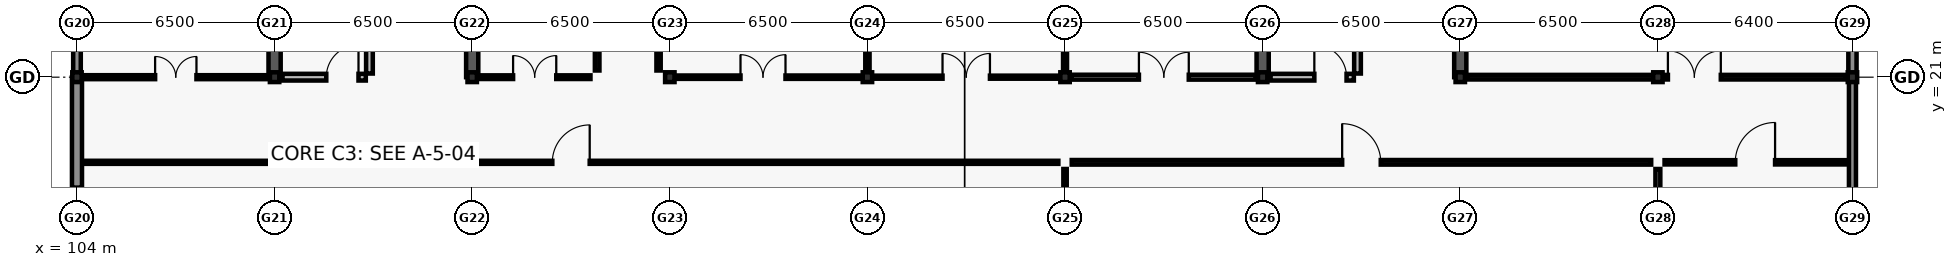
"""IFC4 building model, lengths in metres.
Left out: names, types, materials, properties, quantities, classifications, styles, units other than length and angle.
Written with IfcOpenShell. Run it as: python <this file> out.ifc"""

import sys

from ifc_helpers import new_model, si_unit, direction, frame, frame_2d, origin, origin_2d, place, context, subcontext, project, spatial, rectangle, i_section, extrude, element, fill, save


model = new_model("IFC4")
c1 = context("Model", 3, precision=1e-05, world=origin(), true_north=direction((0.0, 1.0)))
c2 = subcontext(c1, "Body", "Model", "MODEL_VIEW")
j1 = project(units=[si_unit("LENGTHUNIT", "METRE"), si_unit("PLANEANGLEUNIT", "RADIAN")], contexts=[c1])
p1 = place(None, origin())
s1 = spatial("IfcSite", under=j1, at=p1, CompositionType="ELEMENT")
p2 = place(p1, origin())
s2 = spatial("IfcBuilding", under=s1, at=p2, CompositionType="ELEMENT")
p3 = place(p2, frame((0.0, 0.0, 9.6)))
s3 = spatial("IfcBuildingStorey", under=s2, at=p3, CompositionType="ELEMENT", Elevation=9.6)
for number, where, z_axis, x_axis in (
    (1, (104.0, 21.0, 0.0), (0.0, 0.0, 1.0), (1.0, 0.0, 0.0)),
    (2, (110.5, 21.0, 0.0), (0.0, 0.0, 1.0), (1.0, 0.0, 0.0)),
    (3, (117.0, 21.0, 0.0), (0.0, 0.0, 1.0), (1.0, 0.0, 0.0)),
    (4, (123.5, 21.0, 0.0), (0.0, 0.0, 1.0), (1.0, 0.0, 0.0)),
    (5, (130.0, 21.0, 0.0), (0.0, 0.0, 1.0), (1.0, 0.0, 0.0)),
    (6, (136.5, 21.0, 0.0), (0.0, 0.0, 1.0), (1.0, 0.0, 0.0)),
    (7, (143.0, 21.0, 0.0), (0.0, 0.0, 1.0), (1.0, 0.0, 0.0)),
    (8, (149.5, 21.0, 0.0), (0.0, 0.0, 1.0), (1.0, 0.0, 0.0)),
    (9, (156.0, 21.0, 0.0), (0.0, 0.0, 1.0), (1.0, 0.0, 0.0)),
    (10, (162.4, 21.0, 0.0), (0.0, 0.0, 1.0), (1.0, 0.0, 0.0)),
):
    element("IfcColumn", number, at=place(p3, frame(where, z_axis=z_axis, x_axis=x_axis)), inside=s3, PredefinedType="COLUMN", context=c2, shape_type="SweptSolid", body=[
        extrude(i_section(OverallWidth=0.309, OverallDepth=0.321, WebThickness=0.014, FlangeThickness=0.022, FilletRadius=0.017, at=origin_2d()), origin(), (0.0, 0.0, 1.0), 3.9),
    ])
for number, where, z_axis, x_axis in (
    (11, (110.5, 21.0, 0.0), (0.0, 0.0, 1.0), (0.0, 1.0, 0.0)),
    (12, (117.0, 21.0, 0.0), (0.0, 0.0, 1.0), (0.0, 1.0, 0.0)),
    (13, (143.0, 21.0, 0.0), (0.0, 0.0, 1.0), (0.0, 1.0, 0.0)),
    (14, (149.5, 21.0, 0.0), (0.0, 0.0, 1.0), (0.0, 1.0, 0.0)),
):
    element("IfcWall", number, at=place(p3, frame(where, z_axis=z_axis, x_axis=x_axis)), inside=s3, PredefinedType="SHEAR", context=c2, shape_type="SweptSolid", body=[
        extrude(rectangle(XDim=6.4, YDim=0.4, at=frame_2d((3.2, 0.0))), origin(), (0.0, 0.0, 1.0), 3.66),
    ])
p4 = place(p3, frame((104.0, 14.405, 0.0), z_axis=(0.0, 0.0, 1.0), x_axis=(0.0, 1.0, 0.0)))
e15 = element("IfcWall", 15, at=p4, inside=s3, PredefinedType="SOLIDWALL", context=c2, shape_type="SweptSolid", body=[
    extrude(rectangle(XDim=6.59, YDim=0.33, at=frame_2d((3.295, 0.0))), origin(), (0.0, 0.0, 1.0), 3.02),
])
p5 = place(p4, frame((0.863, 0.0, 0.8)))
e16 = element("IfcOpeningElement", 16, at=p5, cuts=e15, PredefinedType="OPENING", context=c2, shape_type="SweptSolid", body=[
    extrude(rectangle(XDim=2.1, YDim=1.25, at=frame_2d((1.05, 0.625))), frame((0.0, 0.175, 0.0), z_axis=(0.0, -1.0, 0.0), x_axis=(1.0, 0.0, 0.0)), (0.0, 0.0, 1.0), 0.35),
])
p6 = place(p3, frame((162.4, 20.995, 0.0), z_axis=(0.0, 0.0, 1.0), x_axis=(0.0, -1.0, 0.0)))
e17 = element("IfcWall", 17, at=p6, inside=s3, PredefinedType="SOLIDWALL", context=c2, shape_type="SweptSolid", body=[
    extrude(rectangle(XDim=6.59, YDim=0.23, at=frame_2d((3.295, 0.0))), origin(), (0.0, 0.0, 1.0), 3.02),
])
p7 = place(p6, frame((3.827, 0.0, 0.8)))
e18 = element("IfcOpeningElement", 18, at=p7, cuts=e17, PredefinedType="OPENING", context=c2, shape_type="SweptSolid", body=[
    extrude(rectangle(XDim=1.7, YDim=1.25, at=frame_2d((0.85, 0.625))), frame((0.0, 0.125, 0.0), z_axis=(0.0, -1.0, 0.0), x_axis=(1.0, 0.0, 0.0)), (0.0, 0.0, 1.0), 0.25),
])
p8 = place(p3, frame((104.0, 21.005, 0.0), z_axis=(0.0, 0.0, 1.0), x_axis=(0.0, 1.0, 0.0)))
e19 = element("IfcWall", 19, at=p8, inside=s3, PredefinedType="SOLIDWALL", context=c2, shape_type="SweptSolid", body=[
    extrude(rectangle(XDim=6.59, YDim=0.25, at=frame_2d((3.295, 0.0))), origin(), (0.0, 0.0, 1.0), 3.02),
])
p9 = place(p8, frame((2.745, 0.0, 0.8)))
e20 = element("IfcOpeningElement", 20, at=p9, cuts=e19, PredefinedType="OPENING", context=c2, shape_type="SweptSolid", body=[
    extrude(rectangle(XDim=1.1, YDim=1.5, at=frame_2d((0.55, 0.75))), frame((0.0, 0.135, 0.0), z_axis=(0.0, -1.0, 0.0), x_axis=(1.0, 0.0, 0.0)), (0.0, 0.0, 1.0), 0.27),
])
p10 = place(p3, frame((162.4, 27.595, 0.0), z_axis=(0.0, 0.0, 1.0), x_axis=(0.0, -1.0, 0.0)))
e21 = element("IfcWall", 21, at=p10, inside=s3, PredefinedType="SOLIDWALL", context=c2, shape_type="SweptSolid", body=[
    extrude(rectangle(XDim=6.59, YDim=0.27, at=frame_2d((3.295, 0.0))), origin(), (0.0, 0.0, 1.0), 3.02),
])
p11 = place(p10, frame((2.67, 0.0, 0.8)))
e22 = element("IfcOpeningElement", 22, at=p11, cuts=e21, PredefinedType="OPENING", context=c2, shape_type="SweptSolid", body=[
    extrude(rectangle(XDim=1.25, YDim=1.5, at=frame_2d((0.625, 0.75))), frame((0.0, 0.145, 0.0), z_axis=(0.0, -1.0, 0.0), x_axis=(1.0, 0.0, 0.0)), (0.0, 0.0, 1.0), 0.29),
])
p12 = place(p3, frame((113.62, 21.12, 0.0), z_axis=(0.0, 0.0, 1.0), x_axis=(0.0, 1.0, 0.0)))
e23 = element("IfcWall", 23, at=p12, inside=s3, PredefinedType="SOLIDWALL", context=c2, shape_type="SweptSolid", body=[
    extrude(rectangle(XDim=6.255, YDim=0.22, at=frame_2d((3.127, 0.0))), origin(), (0.0, 0.0, 1.0), 3.66),
])
p13 = place(p3, frame((110.76, 21.0, 0.0), z_axis=(0.0, 0.0, 1.0), x_axis=(1.0, 0.0, 0.0)))
e24 = element("IfcWall", 24, at=p13, inside=s3, PredefinedType="SOLIDWALL", context=c2, shape_type="SweptSolid", body=[
    extrude(rectangle(XDim=2.74, YDim=0.22, at=frame_2d((1.37, 0.0))), origin(), (0.0, 0.0, 1.0), 3.02),
])
p14 = place(p13, frame((1.44, 0.0, 0.0)))
e25 = element("IfcOpeningElement", 25, at=p14, cuts=e24, PredefinedType="OPENING", context=c2, shape_type="SweptSolid", body=[
    extrude(rectangle(XDim=1.06, YDim=2.1, at=frame_2d((0.53, 1.05))), frame((0.0, 0.12, 0.0), z_axis=(0.0, -1.0, 0.0), x_axis=(1.0, 0.0, 0.0)), (0.0, 0.0, 1.0), 0.24),
])
p15 = place(p3, frame((146.12, 21.12, 0.0), z_axis=(0.0, 0.0, 1.0), x_axis=(0.0, 1.0, 0.0)))
e26 = element("IfcWall", 26, at=p15, inside=s3, PredefinedType="SOLIDWALL", context=c2, shape_type="SweptSolid", body=[
    extrude(rectangle(XDim=6.255, YDim=0.22, at=frame_2d((3.127, 0.0))), origin(), (0.0, 0.0, 1.0), 3.66),
])
p16 = place(p3, frame((143.26, 21.0, 0.0), z_axis=(0.0, 0.0, 1.0), x_axis=(1.0, 0.0, 0.0)))
e27 = element("IfcWall", 27, at=p16, inside=s3, PredefinedType="SOLIDWALL", context=c2, shape_type="SweptSolid", body=[
    extrude(rectangle(XDim=2.74, YDim=0.22, at=frame_2d((1.37, 0.0))), origin(), (0.0, 0.0, 1.0), 3.02),
])
p17 = place(p16, frame((1.44, 0.0, 0.0)))
e28 = element("IfcOpeningElement", 28, at=p17, cuts=e27, PredefinedType="OPENING", context=c2, shape_type="SweptSolid", body=[
    extrude(rectangle(XDim=1.06, YDim=2.1, at=frame_2d((0.53, 1.05))), frame((0.0, 0.12, 0.0), z_axis=(0.0, -1.0, 0.0), x_axis=(1.0, 0.0, 0.0)), (0.0, 0.0, 1.0), 0.24),
])
p18 = place(p3, frame((121.11, 21.22, 0.0), z_axis=(0.0, 0.0, 1.0), x_axis=(0.0, 1.0, 0.0)))
e29 = element("IfcWall", 29, at=p18, inside=s3, PredefinedType="PARTITIONING", context=c2, shape_type="SweptSolid", body=[
    extrude(rectangle(XDim=2.76, YDim=0.15, at=frame_2d((1.38, 0.0))), origin(), (0.0, 0.0, 1.0), 3.0),
])
p19 = place(p18, frame((0.845, 0.0, 0.0)))
e30 = element("IfcOpeningElement", 30, at=p19, cuts=e29, PredefinedType="OPENING", context=c2, shape_type="SweptSolid", body=[
    extrude(rectangle(XDim=1.07, YDim=2.08, at=frame_2d((0.535, 1.04))), frame((0.0, 0.085, 0.0), z_axis=(0.0, -1.0, 0.0), x_axis=(1.0, 0.0, 0.0)), (0.0, 0.0, 1.0), 0.17),
])
p20 = place(p3, frame((123.13, 21.22, 0.0), z_axis=(0.0, 0.0, 1.0), x_axis=(0.0, 1.0, 0.0)))
e31 = element("IfcWall", 31, at=p20, inside=s3, PredefinedType="PARTITIONING", context=c2, shape_type="SweptSolid", body=[
    extrude(rectangle(XDim=2.76, YDim=0.14, at=frame_2d((1.38, 0.0))), origin(), (0.0, 0.0, 1.0), 3.0),
])
p21 = place(p20, frame((0.825, 0.0, 0.0)))
e32 = element("IfcOpeningElement", 32, at=p21, cuts=e31, PredefinedType="OPENING", context=c2, shape_type="SweptSolid", body=[
    extrude(rectangle(XDim=1.11, YDim=2.1, at=frame_2d((0.555, 1.05))), frame((0.0, 0.08, 0.0), z_axis=(0.0, -1.0, 0.0), x_axis=(1.0, 0.0, 0.0)), (0.0, 0.0, 1.0), 0.16),
])
p22 = place(p3, frame((136.5, 8.02, 0.0), z_axis=(0.0, 0.0, 1.0), x_axis=(0.0, 1.0, 0.0)))
e33 = element("IfcWall", 33, at=p22, inside=s3, PredefinedType="PARTITIONING", context=c2, shape_type="SweptSolid", body=[
    extrude(rectangle(XDim=9.96, YDim=0.11, at=frame_2d((4.98, 0.0))), origin(), (0.0, 0.0, 1.0), 3.0),
])
p23 = place(p3, frame((104.22, 18.2, 0.0), z_axis=(0.0, 0.0, 1.0), x_axis=(1.0, 0.0, 0.0)))
e34 = element("IfcWall", 34, at=p23, inside=s3, PredefinedType="PARTITIONING", context=c2, shape_type="SweptSolid", body=[
    extrude(rectangle(XDim=32.06, YDim=0.1, at=frame_2d((16.03, 0.0))), origin(), (0.0, 0.0, 1.0), 3.0),
])
p24 = place(p23, frame((15.415, 0.0, 0.0)))
e35 = element("IfcOpeningElement", 35, at=p24, cuts=e34, PredefinedType="OPENING", context=c2, shape_type="SweptSolid", body=[
    extrude(rectangle(XDim=1.23, YDim=2.08, at=frame_2d((0.615, 1.04))), frame((0.0, 0.06, 0.0), z_axis=(0.0, -1.0, 0.0), x_axis=(1.0, 0.0, 0.0)), (0.0, 0.0, 1.0), 0.12),
])
p25 = place(p3, frame((156.0, 14.62, 0.0), z_axis=(0.0, 0.0, 1.0), x_axis=(0.0, 1.0, 0.0)))
e36 = element("IfcWall", 36, at=p25, inside=s3, PredefinedType="PARTITIONING", context=c2, shape_type="SweptSolid", body=[
    extrude(rectangle(XDim=3.36, YDim=0.16, at=frame_2d((1.68, 0.0))), origin(), (0.0, 0.0, 1.0), 3.0),
])
p26 = place(p3, frame((136.72, 18.2, 0.0), z_axis=(0.0, 0.0, 1.0), x_axis=(1.0, 0.0, 0.0)))
e37 = element("IfcWall", 37, at=p26, inside=s3, PredefinedType="PARTITIONING", context=c2, shape_type="SweptSolid", body=[
    extrude(rectangle(XDim=19.06, YDim=0.15, at=frame_2d((9.53, 0.0))), origin(), (0.0, 0.0, 1.0), 3.0),
])
p27 = place(p26, frame((8.895, 0.0, 0.0)))
e38 = element("IfcOpeningElement", 38, at=p27, cuts=e37, PredefinedType="OPENING", context=c2, shape_type="SweptSolid", body=[
    extrude(rectangle(XDim=1.27, YDim=2.1, at=frame_2d((0.635, 1.05))), frame((0.0, 0.085, 0.0), z_axis=(0.0, -1.0, 0.0), x_axis=(1.0, 0.0, 0.0)), (0.0, 0.0, 1.0), 0.17),
])
p28 = place(p3, frame((156.22, 18.2, 0.0), z_axis=(0.0, 0.0, 1.0), x_axis=(1.0, 0.0, 0.0)))
e39 = element("IfcWall", 39, at=p28, inside=s3, PredefinedType="PARTITIONING", context=c2, shape_type="SweptSolid", body=[
    extrude(rectangle(XDim=5.96, YDim=0.14, at=frame_2d((2.98, 0.0))), origin(), (0.0, 0.0, 1.0), 3.0),
])
p29 = place(p28, frame((2.325, 0.0, 0.0)))
e40 = element("IfcOpeningElement", 40, at=p29, cuts=e39, PredefinedType="OPENING", context=c2, shape_type="SweptSolid", body=[
    extrude(rectangle(XDim=1.31, YDim=2.14, at=frame_2d((0.655, 1.07))), frame((0.0, 0.08, 0.0), z_axis=(0.0, -1.0, 0.0), x_axis=(1.0, 0.0, 0.0)), (0.0, 0.0, 1.0), 0.16),
])
p30 = place(p3, frame((104.22, 21.0, 0.0), z_axis=(0.0, 0.0, 1.0), x_axis=(1.0, 0.0, 0.0)))
e41 = element("IfcWall", 41, at=p30, inside=s3, PredefinedType="PARTITIONING", context=c2, shape_type="SweptSolid", body=[
    extrude(rectangle(XDim=6.06, YDim=0.13, at=frame_2d((3.03, 0.0))), origin(), (0.0, 0.0, 1.0), 3.0),
])
p31 = place(p30, frame((2.35, 0.0, 0.0)))
e42 = element("IfcOpeningElement", 42, at=p31, cuts=e41, PredefinedType="OPENING", context=c2, shape_type="SweptSolid", body=[
    extrude(rectangle(XDim=1.36, YDim=2.15, at=frame_2d((0.68, 1.075))), frame((0.0, 0.075, 0.0), z_axis=(0.0, -1.0, 0.0), x_axis=(1.0, 0.0, 0.0)), (0.0, 0.0, 1.0), 0.15),
])
p32 = place(p3, frame((117.22, 21.0, 0.0), z_axis=(0.0, 0.0, 1.0), x_axis=(1.0, 0.0, 0.0)))
e43 = element("IfcWall", 43, at=p32, inside=s3, PredefinedType="PARTITIONING", context=c2, shape_type="SweptSolid", body=[
    extrude(rectangle(XDim=3.67, YDim=0.12, at=frame_2d((1.835, 0.0))), origin(), (0.0, 0.0, 1.0), 3.0),
])
p33 = place(p32, frame((1.125, 0.0, 0.0)))
e44 = element("IfcOpeningElement", 44, at=p33, cuts=e43, PredefinedType="OPENING", context=c2, shape_type="SweptSolid", body=[
    extrude(rectangle(XDim=1.42, YDim=2.15, at=frame_2d((0.71, 1.075))), frame((0.0, 0.07, 0.0), z_axis=(0.0, -1.0, 0.0), x_axis=(1.0, 0.0, 0.0)), (0.0, 0.0, 1.0), 0.14),
])
p34 = place(p3, frame((123.35, 21.0, 0.0), z_axis=(0.0, 0.0, 1.0), x_axis=(1.0, 0.0, 0.0)))
e45 = element("IfcWall", 45, at=p34, inside=s3, PredefinedType="PARTITIONING", context=c2, shape_type="SweptSolid", body=[
    extrude(rectangle(XDim=6.43, YDim=0.11, at=frame_2d((3.215, 0.0))), origin(), (0.0, 0.0, 1.0), 3.0),
])
p35 = place(p34, frame((2.475, 0.0, 0.0)))
e46 = element("IfcOpeningElement", 46, at=p35, cuts=e45, PredefinedType="OPENING", context=c2, shape_type="SweptSolid", body=[
    extrude(rectangle(XDim=1.48, YDim=2.18, at=frame_2d((0.74, 1.09))), frame((0.0, 0.065, 0.0), z_axis=(0.0, -1.0, 0.0), x_axis=(1.0, 0.0, 0.0)), (0.0, 0.0, 1.0), 0.13),
])
p36 = place(p3, frame((130.22, 21.0, 0.0), z_axis=(0.0, 0.0, 1.0), x_axis=(1.0, 0.0, 0.0)))
e47 = element("IfcWall", 47, at=p36, inside=s3, PredefinedType="PARTITIONING", context=c2, shape_type="SweptSolid", body=[
    extrude(rectangle(XDim=6.06, YDim=0.1, at=frame_2d((3.03, 0.0))), origin(), (0.0, 0.0, 1.0), 3.0),
])
p37 = place(p36, frame((2.25, 0.0, 0.0)))
e48 = element("IfcOpeningElement", 48, at=p37, cuts=e47, PredefinedType="OPENING", context=c2, shape_type="SweptSolid", body=[
    extrude(rectangle(XDim=1.56, YDim=2.18, at=frame_2d((0.78, 1.09))), frame((0.0, 0.06, 0.0), z_axis=(0.0, -1.0, 0.0), x_axis=(1.0, 0.0, 0.0)), (0.0, 0.0, 1.0), 0.12),
])
p38 = place(p3, frame((136.72, 21.0, 0.0), z_axis=(0.0, 0.0, 1.0), x_axis=(1.0, 0.0, 0.0)))
e49 = element("IfcWall", 49, at=p38, inside=s3, PredefinedType="PARTITIONING", context=c2, shape_type="SweptSolid", body=[
    extrude(rectangle(XDim=6.06, YDim=0.16, at=frame_2d((3.03, 0.0))), origin(), (0.0, 0.0, 1.0), 3.0),
])
p39 = place(p38, frame((2.21, 0.0, 0.0)))
e50 = element("IfcOpeningElement", 50, at=p39, cuts=e49, PredefinedType="OPENING", context=c2, shape_type="SweptSolid", body=[
    extrude(rectangle(XDim=1.64, YDim=2.2, at=frame_2d((0.82, 1.1))), frame((0.0, 0.09, 0.0), z_axis=(0.0, -1.0, 0.0), x_axis=(1.0, 0.0, 0.0)), (0.0, 0.0, 1.0), 0.18),
])
p40 = place(p3, frame((149.72, 21.0, 0.0), z_axis=(0.0, 0.0, 1.0), x_axis=(1.0, 0.0, 0.0)))
e51 = element("IfcWall", 51, at=p40, inside=s3, PredefinedType="PARTITIONING", context=c2, shape_type="SweptSolid", body=[
    extrude(rectangle(XDim=12.46, YDim=0.15, at=frame_2d((6.23, 0.0))), origin(), (0.0, 0.0, 1.0), 3.0),
])
p41 = place(p40, frame((6.61, 0.0, 0.0)))
e52 = element("IfcOpeningElement", 52, at=p41, cuts=e51, PredefinedType="OPENING", context=c2, shape_type="SweptSolid", body=[
    extrude(rectangle(XDim=1.74, YDim=2.2, at=frame_2d((0.87, 1.1))), frame((0.0, 0.085, 0.0), z_axis=(0.0, -1.0, 0.0), x_axis=(1.0, 0.0, 0.0)), (0.0, 0.0, 1.0), 0.17),
])
p42 = place(p3, frame((130.0, 21.22, 0.0), z_axis=(0.0, 0.0, 1.0), x_axis=(0.0, 1.0, 0.0)))
e53 = element("IfcWall", 53, at=p42, inside=s3, PredefinedType="PARTITIONING", context=c2, shape_type="SweptSolid", body=[
    extrude(rectangle(XDim=6.16, YDim=0.14, at=frame_2d((3.08, 0.0))), origin(), (0.0, 0.0, 1.0), 3.0),
])
p43 = place(p3, frame((136.5, 21.22, 0.0), z_axis=(0.0, 0.0, 1.0), x_axis=(0.0, 1.0, 0.0)))
e54 = element("IfcWall", 54, at=p43, inside=s3, PredefinedType="PARTITIONING", context=c2, shape_type="SweptSolid", body=[
    extrude(rectangle(XDim=6.16, YDim=0.13, at=frame_2d((3.08, 0.0))), origin(), (0.0, 0.0, 1.0), 3.0),
])
p44 = place(p14, origin())
e55 = element("IfcDoor", 55, at=p44, inside=s3, OperationType="SINGLE_SWING_RIGHT", PredefinedType="DOOR", context=c2, shape_type="SweptSolid", body=[
    extrude(rectangle(XDim=1.06, YDim=2.1, at=frame_2d((0.53, 1.05))), frame((0.0, 0.025, 0.0), z_axis=(0.0, -1.0, 0.0), x_axis=(1.0, 0.0, 0.0)), (0.0, 0.0, 1.0), 0.05),
])
fill(e25, e55)
p45 = place(p17, origin())
e56 = element("IfcDoor", 56, at=p45, inside=s3, OperationType="SINGLE_SWING_LEFT", PredefinedType="DOOR", context=c2, shape_type="SweptSolid", body=[
    extrude(rectangle(XDim=1.06, YDim=2.1, at=frame_2d((0.53, 1.05))), frame((0.0, 0.025, 0.0), z_axis=(0.0, -1.0, 0.0), x_axis=(1.0, 0.0, 0.0)), (0.0, 0.0, 1.0), 0.05),
])
fill(e28, e56)
p46 = place(p24, origin())
e57 = element("IfcDoor", 57, at=p46, inside=s3, OperationType="SINGLE_SWING_RIGHT", PredefinedType="DOOR", context=c2, shape_type="SweptSolid", body=[
    extrude(rectangle(XDim=1.23, YDim=2.08, at=frame_2d((0.615, 1.04))), frame((0.0, 0.025, 0.0), z_axis=(0.0, -1.0, 0.0), x_axis=(1.0, 0.0, 0.0)), (0.0, 0.0, 1.0), 0.05),
])
fill(e35, e57)
p47 = place(p27, origin())
e58 = element("IfcDoor", 58, at=p47, inside=s3, OperationType="SINGLE_SWING_LEFT", PredefinedType="DOOR", context=c2, shape_type="SweptSolid", body=[
    extrude(rectangle(XDim=1.27, YDim=2.1, at=frame_2d((0.635, 1.05))), frame((0.0, 0.025, 0.0), z_axis=(0.0, -1.0, 0.0), x_axis=(1.0, 0.0, 0.0)), (0.0, 0.0, 1.0), 0.05),
])
fill(e38, e58)
p48 = place(p29, origin())
e59 = element("IfcDoor", 59, at=p48, inside=s3, OperationType="SINGLE_SWING_RIGHT", PredefinedType="DOOR", context=c2, shape_type="SweptSolid", body=[
    extrude(rectangle(XDim=1.31, YDim=2.14, at=frame_2d((0.655, 1.07))), frame((0.0, 0.025, 0.0), z_axis=(0.0, -1.0, 0.0), x_axis=(1.0, 0.0, 0.0)), (0.0, 0.0, 1.0), 0.05),
])
fill(e40, e59)
p49 = place(p31, origin())
e60 = element("IfcDoor", 60, at=p49, inside=s3, OperationType="DOUBLE_DOOR_SINGLE_SWING", PredefinedType="DOOR", context=c2, shape_type="SweptSolid", body=[
    extrude(rectangle(XDim=1.36, YDim=2.15, at=frame_2d((0.68, 1.075))), frame((0.0, 0.025, 0.0), z_axis=(0.0, -1.0, 0.0), x_axis=(1.0, 0.0, 0.0)), (0.0, 0.0, 1.0), 0.05),
])
fill(e42, e60)
p50 = place(p33, origin())
e61 = element("IfcDoor", 61, at=p50, inside=s3, OperationType="DOUBLE_DOOR_SINGLE_SWING", PredefinedType="DOOR", context=c2, shape_type="SweptSolid", body=[
    extrude(rectangle(XDim=1.42, YDim=2.15, at=frame_2d((0.71, 1.075))), frame((0.0, 0.025, 0.0), z_axis=(0.0, -1.0, 0.0), x_axis=(1.0, 0.0, 0.0)), (0.0, 0.0, 1.0), 0.05),
])
fill(e44, e61)
p51 = place(p35, origin())
e62 = element("IfcDoor", 62, at=p51, inside=s3, OperationType="DOUBLE_DOOR_SINGLE_SWING", PredefinedType="DOOR", context=c2, shape_type="SweptSolid", body=[
    extrude(rectangle(XDim=1.48, YDim=2.18, at=frame_2d((0.74, 1.09))), frame((0.0, 0.025, 0.0), z_axis=(0.0, -1.0, 0.0), x_axis=(1.0, 0.0, 0.0)), (0.0, 0.0, 1.0), 0.05),
])
fill(e46, e62)
p52 = place(p37, origin())
e63 = element("IfcDoor", 63, at=p52, inside=s3, OperationType="DOUBLE_DOOR_SINGLE_SWING", PredefinedType="DOOR", context=c2, shape_type="SweptSolid", body=[
    extrude(rectangle(XDim=1.56, YDim=2.18, at=frame_2d((0.78, 1.09))), frame((0.0, 0.025, 0.0), z_axis=(0.0, -1.0, 0.0), x_axis=(1.0, 0.0, 0.0)), (0.0, 0.0, 1.0), 0.05),
])
fill(e48, e63)
p53 = place(p39, origin())
e64 = element("IfcDoor", 64, at=p53, inside=s3, OperationType="DOUBLE_DOOR_SINGLE_SWING", PredefinedType="DOOR", context=c2, shape_type="SweptSolid", body=[
    extrude(rectangle(XDim=1.64, YDim=2.2, at=frame_2d((0.82, 1.1))), frame((0.0, 0.025, 0.0), z_axis=(0.0, -1.0, 0.0), x_axis=(1.0, 0.0, 0.0)), (0.0, 0.0, 1.0), 0.05),
])
fill(e50, e64)
p54 = place(p41, origin())
e65 = element("IfcDoor", 65, at=p54, inside=s3, OperationType="DOUBLE_DOOR_SINGLE_SWING", PredefinedType="DOOR", context=c2, shape_type="SweptSolid", body=[
    extrude(rectangle(XDim=1.74, YDim=2.2, at=frame_2d((0.87, 1.1))), frame((0.0, 0.025, 0.0), z_axis=(0.0, -1.0, 0.0), x_axis=(1.0, 0.0, 0.0)), (0.0, 0.0, 1.0), 0.05),
])
fill(e52, e65)
save(model, sys.argv[1])
